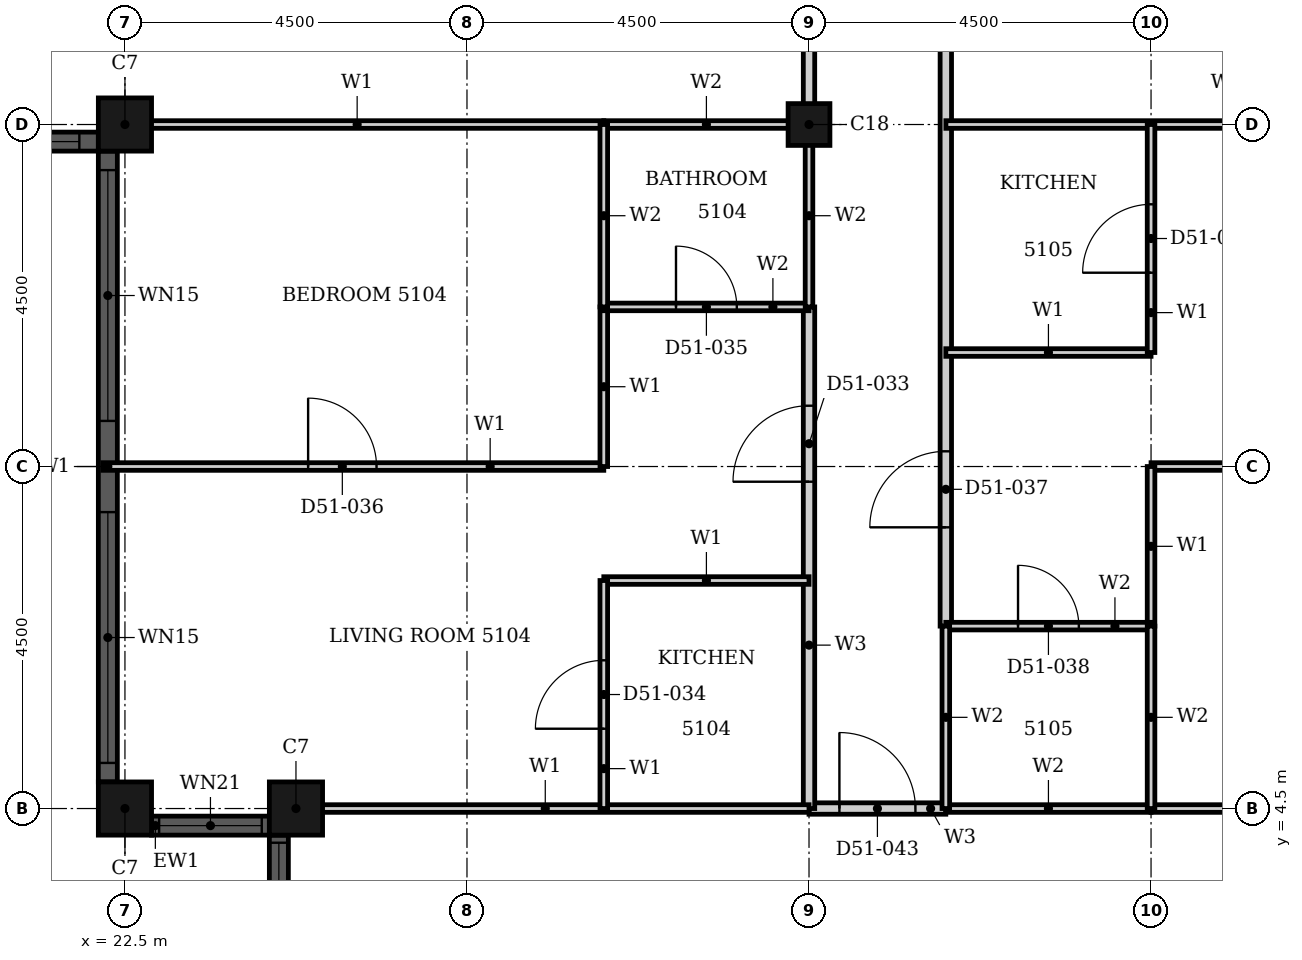
"""IFC4 building model, lengths in metres.
Left out: names, types, materials, properties, quantities, classifications, styles, units other than length and angle.
Written with IfcOpenShell. Run it as: python <this file> out.ifc"""

import sys

from ifc_helpers import new_model, si_unit, direction, frame, frame_2d, origin, origin_2d, place, context, subcontext, project, spatial, rectangle, hollow_rectangle, extrude, element, fill, save


model = new_model("IFC4")
c1 = context("Model", 3, precision=1e-05, world=origin(), true_north=direction((0.0, 1.0)))
c2 = subcontext(c1, "Body", "Model", "MODEL_VIEW")
j1 = project(units=[si_unit("LENGTHUNIT", "METRE"), si_unit("PLANEANGLEUNIT", "RADIAN")], contexts=[c1])
p1 = place(None, origin())
s1 = spatial("IfcSite", under=j1, at=p1, CompositionType="ELEMENT")
p2 = place(p1, origin())
s2 = spatial("IfcBuilding", under=s1, at=p2, CompositionType="ELEMENT")
p3 = place(p2, frame((0.0, 0.0, 203.5)))
s3 = spatial("IfcBuildingStorey", under=s2, at=p3, CompositionType="ELEMENT", Elevation=203.5)
for number, where, z_axis, x_axis in (
    (1, (22.5, 13.5, 0.0), (0.0, 0.0, 1.0), (1.0, 0.0, 0.0)),
    (2, (22.5, 4.5, 0.0), (0.0, 0.0, 1.0), (1.0, 0.0, 0.0)),
    (3, (24.75, 4.5, 0.0), (0.0, 0.0, 1.0), (1.0, 0.0, 0.0)),
):
    element("IfcColumn", number, at=place(p3, frame(where, z_axis=z_axis, x_axis=x_axis)), inside=s3, PredefinedType="COLUMN", context=c2, shape_type="SweptSolid", body=[
        extrude(hollow_rectangle(XDim=0.7, YDim=0.7, WallThickness=0.022, at=origin_2d()), origin(), (0.0, 0.0, 1.0), 3.7),
    ])
p4 = place(p3, frame((31.5, 13.5, 0.0), z_axis=(0.0, 0.0, 1.0), x_axis=(1.0, 0.0, 0.0)))
e4 = element("IfcColumn", 4, at=p4, inside=s3, PredefinedType="COLUMN", context=c2, shape_type="SweptSolid", body=[
    extrude(hollow_rectangle(XDim=0.55, YDim=0.55, WallThickness=0.018, at=origin_2d()), origin(), (0.0, 0.0, 1.0), 3.7),
])
p5 = place(p3, frame((18.35, 13.275, 0.0), z_axis=(0.0, 0.0, 1.0), x_axis=(1.0, 0.0, 0.0)))
e5 = element("IfcWall", 5, at=p5, inside=s3, PredefinedType="SOLIDWALL", context=c2, shape_type="SweptSolid", body=[
    extrude(rectangle(XDim=3.8, YDim=0.25, at=frame_2d((1.9, 0.0))), origin(), (0.0, 0.0, 1.0), 3.7),
])
p6 = place(p5, frame((0.25, 0.0, 0.45)))
e6 = element("IfcOpeningElement", 6, at=p6, cuts=e5, PredefinedType="OPENING", context=c2, shape_type="SweptSolid", body=[
    extrude(rectangle(XDim=3.3, YDim=2.3, at=frame_2d((1.65, 1.15))), frame((0.0, 0.135, 0.0), z_axis=(0.0, -1.0, 0.0), x_axis=(1.0, 0.0, 0.0)), (0.0, 0.0, 1.0), 0.27),
])
p7 = place(p3, frame((22.275, 13.15, 0.0), z_axis=(0.0, 0.0, 1.0), x_axis=(0.0, -1.0, 0.0)))
e7 = element("IfcWall", 7, at=p7, inside=s3, PredefinedType="SOLIDWALL", context=c2, shape_type="SweptSolid", body=[
    extrude(rectangle(XDim=8.3, YDim=0.25, at=frame_2d((4.15, 0.0))), origin(), (0.0, 0.0, 1.0), 3.7),
])
p8 = place(p7, frame((0.25, 0.0, 0.45)))
e8 = element("IfcOpeningElement", 8, at=p8, cuts=e7, PredefinedType="OPENING", context=c2, shape_type="SweptSolid", body=[
    extrude(rectangle(XDim=3.3, YDim=2.3, at=frame_2d((1.65, 1.15))), frame((0.0, 0.135, 0.0), z_axis=(0.0, -1.0, 0.0), x_axis=(1.0, 0.0, 0.0)), (0.0, 0.0, 1.0), 0.27),
])
p9 = place(p7, frame((4.75, 0.0, 0.45)))
e9 = element("IfcOpeningElement", 9, at=p9, cuts=e7, PredefinedType="OPENING", context=c2, shape_type="SweptSolid", body=[
    extrude(rectangle(XDim=3.3, YDim=2.3, at=frame_2d((1.65, 1.15))), frame((0.0, 0.135, 0.0), z_axis=(0.0, -1.0, 0.0), x_axis=(1.0, 0.0, 0.0)), (0.0, 0.0, 1.0), 0.27),
])
p10 = place(p3, frame((22.85, 4.275, 0.0), z_axis=(0.0, 0.0, 1.0), x_axis=(1.0, 0.0, 0.0)))
e10 = element("IfcWall", 10, at=p10, inside=s3, PredefinedType="SOLIDWALL", context=c2, shape_type="SweptSolid", body=[
    extrude(rectangle(XDim=1.55, YDim=0.25, at=frame_2d((0.775, 0.0))), origin(), (0.0, 0.0, 1.0), 3.7),
])
p11 = place(p10, frame((0.1, 0.0, 0.9)))
e11 = element("IfcOpeningElement", 11, at=p11, cuts=e10, PredefinedType="OPENING", context=c2, shape_type="SweptSolid", body=[
    extrude(rectangle(XDim=1.35, YDim=1.85, at=frame_2d((0.675, 0.925))), frame((0.0, 0.135, 0.0), z_axis=(0.0, -1.0, 0.0), x_axis=(1.0, 0.0, 0.0)), (0.0, 0.0, 1.0), 0.27),
])
p12 = place(p3, frame((24.525, 4.15, 0.0), z_axis=(0.0, 0.0, 1.0), x_axis=(0.0, -1.0, 0.0)))
e12 = element("IfcWall", 12, at=p12, inside=s3, PredefinedType="SOLIDWALL", context=c2, shape_type="SweptSolid", body=[
    extrude(rectangle(XDim=1.55, YDim=0.25, at=frame_2d((0.775, 0.0))), origin(), (0.0, 0.0, 1.0), 3.7),
])
p13 = place(p12, frame((0.1, 0.0, 0.9)))
e13 = element("IfcOpeningElement", 13, at=p13, cuts=e12, PredefinedType="OPENING", context=c2, shape_type="SweptSolid", body=[
    extrude(rectangle(XDim=1.35, YDim=1.85, at=frame_2d((0.675, 0.925))), frame((0.0, 0.135, 0.0), z_axis=(0.0, -1.0, 0.0), x_axis=(1.0, 0.0, 0.0)), (0.0, 0.0, 1.0), 0.27),
])
p14 = place(p3, frame((31.5, 4.5, 0.0), z_axis=(0.0, 0.0, 1.0), x_axis=(1.0, 0.0, 0.0)))
e14 = element("IfcWall", 14, at=p14, inside=s3, PredefinedType="PARTITIONING", context=c2, shape_type="SweptSolid", body=[
    extrude(rectangle(XDim=1.8, YDim=0.15, at=frame_2d((0.9, 0.0))), origin(), (0.0, 0.0, 1.0), 3.4),
])
p15 = place(p14, frame((0.4, 0.0, 0.0)))
e15 = element("IfcOpeningElement", 15, at=p15, cuts=e14, PredefinedType="OPENING", context=c2, shape_type="SweptSolid", body=[
    extrude(rectangle(XDim=1.0, YDim=2.1, at=frame_2d((0.5, 1.05))), frame((0.0, 0.085, 0.0), z_axis=(0.0, -1.0, 0.0), x_axis=(1.0, 0.0, 0.0)), (0.0, 0.0, 1.0), 0.17),
])
p16 = place(p3, frame((31.5, 4.5, 0.0), z_axis=(0.0, 0.0, 1.0), x_axis=(0.0, 1.0, 0.0)))
e16 = element("IfcWall", 16, at=p16, inside=s3, PredefinedType="PARTITIONING", context=c2, shape_type="SweptSolid", body=[
    extrude(rectangle(XDim=6.6, YDim=0.15, at=frame_2d((3.3, 0.0))), origin(), (0.0, 0.0, 1.0), 2.68),
])
p17 = place(p16, frame((4.3, 0.0, 0.0)))
e17 = element("IfcOpeningElement", 17, at=p17, cuts=e16, PredefinedType="OPENING", context=c2, shape_type="SweptSolid", body=[
    extrude(rectangle(XDim=1.0, YDim=2.2, at=frame_2d((0.5, 1.1))), frame((0.0, 0.085, 0.0), z_axis=(0.0, -1.0, 0.0), x_axis=(1.0, 0.0, 0.0)), (0.0, 0.0, 1.0), 0.17),
])
p18 = place(p3, frame((31.5, 13.5, 0.0), z_axis=(0.0, 0.0, 1.0), x_axis=(0.0, 1.0, 0.0)))
e18 = element("IfcWall", 18, at=p18, inside=s3, PredefinedType="PARTITIONING", context=c2, shape_type="SweptSolid", body=[
    extrude(rectangle(XDim=7.2, YDim=0.15, at=frame_2d((3.6, 0.0))), origin(), (0.0, 0.0, 1.0), 3.4),
])
p19 = place(p3, frame((33.3, 6.9, 0.0), z_axis=(0.0, 0.0, 1.0), x_axis=(0.0, 1.0, 0.0)))
e19 = element("IfcWall", 19, at=p19, inside=s3, PredefinedType="PARTITIONING", context=c2, shape_type="SweptSolid", body=[
    extrude(rectangle(XDim=13.799, YDim=0.15, at=frame_2d((6.899, 0.0))), origin(), (0.0, 0.0, 1.0), 3.4),
])
p20 = place(p19, frame((1.3, 0.0, 0.0)))
e20 = element("IfcOpeningElement", 20, at=p20, cuts=e19, PredefinedType="OPENING", context=c2, shape_type="SweptSolid", body=[
    extrude(rectangle(XDim=1.0, YDim=2.2, at=frame_2d((0.5, 1.1))), frame((0.0, 0.085, 0.0), z_axis=(0.0, -1.0, 0.0), x_axis=(1.0, 0.0, 0.0)), (0.0, 0.0, 1.0), 0.17),
])
p21 = place(p3, frame((33.3, 10.5, 0.0), z_axis=(0.0, 0.0, 1.0), x_axis=(1.0, 0.0, 0.0)))
e21 = element("IfcWall", 21, at=p21, inside=s3, PredefinedType="PARTITIONING", context=c2, shape_type="SweptSolid", body=[
    extrude(rectangle(XDim=2.7, YDim=0.1, at=frame_2d((1.35, 0.0))), origin(), (0.0, 0.0, 1.0), 3.4),
])
p22 = place(p3, frame((33.301, 13.5, 0.0), z_axis=(0.0, 0.0, 1.0), x_axis=(1.0, 0.0, 0.0)))
e22 = element("IfcWall", 22, at=p22, inside=s3, PredefinedType="PARTITIONING", context=c2, shape_type="SweptSolid", body=[
    extrude(rectangle(XDim=7.389, YDim=0.1, at=frame_2d((3.694, 0.0))), origin(), (0.0, 0.0, 1.0), 2.48),
])
p23 = place(p3, frame((22.31, 13.5, 0.0), z_axis=(0.0, 0.0, 1.0), x_axis=(1.0, 0.0, 0.0)))
e23 = element("IfcWall", 23, at=p23, inside=s3, PredefinedType="PARTITIONING", context=c2, shape_type="SweptSolid", body=[
    extrude(rectangle(XDim=6.49, YDim=0.1, at=frame_2d((3.245, 0.0))), origin(), (0.0, 0.0, 1.0), 2.48),
])
p24 = place(p3, frame((36.0, 4.5, 0.0), z_axis=(0.0, 0.0, 1.0), x_axis=(1.0, 0.0, 0.0)))
e24 = element("IfcWall", 24, at=p24, inside=s3, PredefinedType="PARTITIONING", context=c2, shape_type="SweptSolid", body=[
    extrude(rectangle(XDim=2.44, YDim=0.1, at=frame_2d((1.22, 0.0))), origin(), (0.0, 0.0, 1.0), 3.4),
])
p25 = place(p3, frame((24.56, 4.5, 0.0), z_axis=(0.0, 0.0, 1.0), x_axis=(1.0, 0.0, 0.0)))
e25 = element("IfcWall", 25, at=p25, inside=s3, PredefinedType="PARTITIONING", context=c2, shape_type="SweptSolid", body=[
    extrude(rectangle(XDim=6.94, YDim=0.1, at=frame_2d((3.47, 0.0))), origin(), (0.0, 0.0, 1.0), 3.4),
])
p26 = place(p3, frame((28.8, 7.5, 0.0), z_axis=(0.0, 0.0, 1.0), x_axis=(1.0, 0.0, 0.0)))
e26 = element("IfcWall", 26, at=p26, inside=s3, PredefinedType="PARTITIONING", context=c2, shape_type="SweptSolid", body=[
    extrude(rectangle(XDim=2.7, YDim=0.1, at=frame_2d((1.35, 0.0))), origin(), (0.0, 0.0, 1.0), 3.4),
])
p27 = place(p3, frame((36.0, 9.0, 0.0), z_axis=(0.0, 0.0, 1.0), x_axis=(1.0, 0.0, 0.0)))
e27 = element("IfcWall", 27, at=p27, inside=s3, PredefinedType="PARTITIONING", context=c2, shape_type="SweptSolid", body=[
    extrude(rectangle(XDim=4.79, YDim=0.1, at=frame_2d((2.395, 0.0))), origin(), (0.0, 0.0, 1.0), 3.4),
])
p28 = place(p27, frame((1.8, 0.0, 0.0)))
e28 = element("IfcOpeningElement", 28, at=p28, cuts=e27, PredefinedType="OPENING", context=c2, shape_type="SweptSolid", body=[
    extrude(rectangle(XDim=0.9, YDim=2.1, at=frame_2d((0.45, 1.05))), frame((0.0, 0.06, 0.0), z_axis=(0.0, -1.0, 0.0), x_axis=(1.0, 0.0, 0.0)), (0.0, 0.0, 1.0), 0.12),
])
p29 = place(p3, frame((22.21, 9.0, 0.0), z_axis=(0.0, 0.0, 1.0), x_axis=(1.0, 0.0, 0.0)))
e29 = element("IfcWall", 29, at=p29, inside=s3, PredefinedType="PARTITIONING", context=c2, shape_type="SweptSolid", body=[
    extrude(rectangle(XDim=6.59, YDim=0.1, at=frame_2d((3.295, 0.0))), origin(), (0.0, 0.0, 1.0), 3.4),
])
p30 = place(p29, frame((2.7, 0.0, 0.0)))
e30 = element("IfcOpeningElement", 30, at=p30, cuts=e29, PredefinedType="OPENING", context=c2, shape_type="SweptSolid", body=[
    extrude(rectangle(XDim=0.9, YDim=2.1, at=frame_2d((0.45, 1.05))), frame((0.0, 0.06, 0.0), z_axis=(0.0, -1.0, 0.0), x_axis=(1.0, 0.0, 0.0)), (0.0, 0.0, 1.0), 0.12),
])
p31 = place(p3, frame((28.8, 9.0, 0.0), z_axis=(0.0, 0.0, 1.0), x_axis=(0.0, 1.0, 0.0)))
e31 = element("IfcWall", 31, at=p31, inside=s3, PredefinedType="PARTITIONING", context=c2, shape_type="SweptSolid", body=[
    extrude(rectangle(XDim=2.1, YDim=0.1, at=frame_2d((1.05, 0.0))), origin(), (0.0, 0.0, 1.0), 3.4),
])
p32 = place(p3, frame((28.8, 4.5, 0.0), z_axis=(0.0, 0.0, 1.0), x_axis=(0.0, 1.0, 0.0)))
e32 = element("IfcWall", 32, at=p32, inside=s3, PredefinedType="PARTITIONING", context=c2, shape_type="SweptSolid", body=[
    extrude(rectangle(XDim=3.0, YDim=0.1, at=frame_2d((1.5, 0.0))), origin(), (0.0, 0.0, 1.0), 3.4),
])
p33 = place(p32, frame((1.05, 0.0, 0.0)))
e33 = element("IfcOpeningElement", 33, at=p33, cuts=e32, PredefinedType="OPENING", context=c2, shape_type="SweptSolid", body=[
    extrude(rectangle(XDim=0.9, YDim=2.1, at=frame_2d((0.45, 1.05))), frame((0.0, 0.06, 0.0), z_axis=(0.0, -1.0, 0.0), x_axis=(1.0, 0.0, 0.0)), (0.0, 0.0, 1.0), 0.12),
])
p34 = place(p3, frame((36.0, 6.9, 0.0), z_axis=(0.0, 0.0, 1.0), x_axis=(0.0, 1.0, 0.0)))
e34 = element("IfcWall", 34, at=p34, inside=s3, PredefinedType="PARTITIONING", context=c2, shape_type="SweptSolid", body=[
    extrude(rectangle(XDim=2.1, YDim=0.1, at=frame_2d((1.05, 0.0))), origin(), (0.0, 0.0, 1.0), 2.68),
])
p35 = place(p3, frame((36.0, 10.5, 0.0), z_axis=(0.0, 0.0, 1.0), x_axis=(0.0, 1.0, 0.0)))
e35 = element("IfcWall", 35, at=p35, inside=s3, PredefinedType="PARTITIONING", context=c2, shape_type="SweptSolid", body=[
    extrude(rectangle(XDim=3.0, YDim=0.1, at=frame_2d((1.5, 0.0))), origin(), (0.0, 0.0, 1.0), 2.68),
])
p36 = place(p35, frame((1.05, 0.0, 0.0)))
e36 = element("IfcOpeningElement", 36, at=p36, cuts=e35, PredefinedType="OPENING", context=c2, shape_type="SweptSolid", body=[
    extrude(rectangle(XDim=0.9, YDim=2.1, at=frame_2d((0.45, 1.05))), frame((0.0, 0.06, 0.0), z_axis=(0.0, -1.0, 0.0), x_axis=(1.0, 0.0, 0.0)), (0.0, 0.0, 1.0), 0.12),
])
p37 = place(p3, frame((28.8, 11.1, 0.0), z_axis=(0.0, 0.0, 1.0), x_axis=(1.0, 0.0, 0.0)))
e37 = element("IfcWall", 37, at=p37, inside=s3, PredefinedType="PARTITIONING", context=c2, shape_type="SweptSolid", body=[
    extrude(rectangle(XDim=2.7, YDim=0.1, at=frame_2d((1.35, 0.0))), origin(), (0.0, 0.0, 1.0), 3.4),
])
p38 = place(p37, frame((0.95, 0.0, 0.0)))
e38 = element("IfcOpeningElement", 38, at=p38, cuts=e37, PredefinedType="OPENING", context=c2, shape_type="SweptSolid", body=[
    extrude(rectangle(XDim=0.8, YDim=2.1, at=frame_2d((0.4, 1.05))), frame((0.0, 0.06, 0.0), z_axis=(0.0, -1.0, 0.0), x_axis=(1.0, 0.0, 0.0)), (0.0, 0.0, 1.0), 0.12),
])
p39 = place(p3, frame((28.8, 13.5, 0.0), z_axis=(0.0, 0.0, 1.0), x_axis=(1.0, 0.0, 0.0)))
e39 = element("IfcWall", 39, at=p39, inside=s3, PredefinedType="PARTITIONING", context=c2, shape_type="SweptSolid", body=[
    extrude(rectangle(XDim=2.7, YDim=0.1, at=frame_2d((1.35, 0.0))), origin(), (0.0, 0.0, 1.0), 2.48),
])
p40 = place(p3, frame((33.3, 4.5, 0.0), z_axis=(0.0, 0.0, 1.0), x_axis=(1.0, 0.0, 0.0)))
e40 = element("IfcWall", 40, at=p40, inside=s3, PredefinedType="PARTITIONING", context=c2, shape_type="SweptSolid", body=[
    extrude(rectangle(XDim=2.7, YDim=0.1, at=frame_2d((1.35, 0.0))), origin(), (0.0, 0.0, 1.0), 3.4),
])
p41 = place(p3, frame((33.3, 6.9, 0.0), z_axis=(0.0, 0.0, 1.0), x_axis=(1.0, 0.0, 0.0)))
e41 = element("IfcWall", 41, at=p41, inside=s3, PredefinedType="PARTITIONING", context=c2, shape_type="SweptSolid", body=[
    extrude(rectangle(XDim=2.7, YDim=0.1, at=frame_2d((1.35, 0.0))), origin(), (0.0, 0.0, 1.0), 3.4),
])
p42 = place(p41, frame((0.95, 0.0, 0.0)))
e42 = element("IfcOpeningElement", 42, at=p42, cuts=e41, PredefinedType="OPENING", context=c2, shape_type="SweptSolid", body=[
    extrude(rectangle(XDim=0.8, YDim=2.1, at=frame_2d((0.4, 1.05))), frame((0.0, 0.06, 0.0), z_axis=(0.0, -1.0, 0.0), x_axis=(1.0, 0.0, 0.0)), (0.0, 0.0, 1.0), 0.12),
])
p43 = place(p3, frame((28.8, 11.1, 0.0), z_axis=(0.0, 0.0, 1.0), x_axis=(0.0, 1.0, 0.0)))
e43 = element("IfcWall", 43, at=p43, inside=s3, PredefinedType="PARTITIONING", context=c2, shape_type="SweptSolid", body=[
    extrude(rectangle(XDim=2.4, YDim=0.1, at=frame_2d((1.2, 0.0))), origin(), (0.0, 0.0, 1.0), 3.4),
])
p44 = place(p3, frame((31.5, 11.1, 0.0), z_axis=(0.0, 0.0, 1.0), x_axis=(0.0, 1.0, 0.0)))
e44 = element("IfcWall", 44, at=p44, inside=s3, PredefinedType="PARTITIONING", context=c2, shape_type="SweptSolid", body=[
    extrude(rectangle(XDim=2.4, YDim=0.1, at=frame_2d((1.2, 0.0))), origin(), (0.0, 0.0, 1.0), 2.68),
])
p45 = place(p3, frame((33.3, 4.5, 0.0), z_axis=(0.0, 0.0, 1.0), x_axis=(0.0, 1.0, 0.0)))
e45 = element("IfcWall", 45, at=p45, inside=s3, PredefinedType="PARTITIONING", context=c2, shape_type="SweptSolid", body=[
    extrude(rectangle(XDim=2.4, YDim=0.1, at=frame_2d((1.2, 0.0))), origin(), (0.0, 0.0, 1.0), 3.4),
])
p46 = place(p3, frame((36.0, 4.5, 0.0), z_axis=(0.0, 0.0, 1.0), x_axis=(0.0, 1.0, 0.0)))
e46 = element("IfcWall", 46, at=p46, inside=s3, PredefinedType="PARTITIONING", context=c2, shape_type="SweptSolid", body=[
    extrude(rectangle(XDim=2.4, YDim=0.1, at=frame_2d((1.2, 0.0))), origin(), (0.0, 0.0, 1.0), 2.68),
])
p47 = place(p6, origin())
e47 = element("IfcWindow", 47, at=p47, inside=s3, PartitioningType="SINGLE_PANEL", PredefinedType="WINDOW", context=c2, shape_type="SweptSolid", body=[
    extrude(rectangle(XDim=3.3, YDim=2.3, at=frame_2d((1.65, 1.15))), frame((0.0, 0.03, 0.0), z_axis=(0.0, -1.0, 0.0), x_axis=(1.0, 0.0, 0.0)), (0.0, 0.0, 1.0), 0.06),
])
fill(e6, e47)
p48 = place(p8, origin())
e48 = element("IfcWindow", 48, at=p48, inside=s3, PartitioningType="SINGLE_PANEL", PredefinedType="WINDOW", context=c2, shape_type="SweptSolid", body=[
    extrude(rectangle(XDim=3.3, YDim=2.3, at=frame_2d((1.65, 1.15))), frame((0.0, 0.03, 0.0), z_axis=(0.0, -1.0, 0.0), x_axis=(1.0, 0.0, 0.0)), (0.0, 0.0, 1.0), 0.06),
])
fill(e8, e48)
p49 = place(p9, origin())
e49 = element("IfcWindow", 49, at=p49, inside=s3, PartitioningType="SINGLE_PANEL", PredefinedType="WINDOW", context=c2, shape_type="SweptSolid", body=[
    extrude(rectangle(XDim=3.3, YDim=2.3, at=frame_2d((1.65, 1.15))), frame((0.0, 0.03, 0.0), z_axis=(0.0, -1.0, 0.0), x_axis=(1.0, 0.0, 0.0)), (0.0, 0.0, 1.0), 0.06),
])
fill(e9, e49)
p50 = place(p11, origin())
e50 = element("IfcWindow", 50, at=p50, inside=s3, PartitioningType="SINGLE_PANEL", PredefinedType="WINDOW", context=c2, shape_type="SweptSolid", body=[
    extrude(rectangle(XDim=1.35, YDim=1.85, at=frame_2d((0.675, 0.925))), frame((0.0, 0.03, 0.0), z_axis=(0.0, -1.0, 0.0), x_axis=(1.0, 0.0, 0.0)), (0.0, 0.0, 1.0), 0.06),
])
fill(e11, e50)
p51 = place(p13, origin())
e51 = element("IfcWindow", 51, at=p51, inside=s3, PartitioningType="SINGLE_PANEL", PredefinedType="WINDOW", context=c2, shape_type="SweptSolid", body=[
    extrude(rectangle(XDim=1.35, YDim=1.85, at=frame_2d((0.675, 0.925))), frame((0.0, 0.03, 0.0), z_axis=(0.0, -1.0, 0.0), x_axis=(1.0, 0.0, 0.0)), (0.0, 0.0, 1.0), 0.06),
])
fill(e13, e51)
p52 = place(p17, origin())
e52 = element("IfcDoor", 52, at=p52, inside=s3, OperationType="SINGLE_SWING_LEFT", PredefinedType="DOOR", context=c2, shape_type="SweptSolid", body=[
    extrude(rectangle(XDim=1.0, YDim=2.2, at=frame_2d((0.5, 1.1))), frame((0.0, 0.025, 0.0), z_axis=(0.0, -1.0, 0.0), x_axis=(1.0, 0.0, 0.0)), (0.0, 0.0, 1.0), 0.05),
])
fill(e17, e52)
p53 = place(p33, origin())
e53 = element("IfcDoor", 53, at=p53, inside=s3, OperationType="SINGLE_SWING_RIGHT", PredefinedType="DOOR", context=c2, shape_type="SweptSolid", body=[
    extrude(rectangle(XDim=0.9, YDim=2.1, at=frame_2d((0.45, 1.05))), frame((0.0, 0.025, 0.0), z_axis=(0.0, -1.0, 0.0), x_axis=(1.0, 0.0, 0.0)), (0.0, 0.0, 1.0), 0.05),
])
fill(e33, e53)
p54 = place(p38, origin())
e54 = element("IfcDoor", 54, at=p54, inside=s3, OperationType="SINGLE_SWING_LEFT", PredefinedType="DOOR", context=c2, shape_type="SweptSolid", body=[
    extrude(rectangle(XDim=0.8, YDim=2.1, at=frame_2d((0.4, 1.05))), frame((0.0, 0.025, 0.0), z_axis=(0.0, -1.0, 0.0), x_axis=(1.0, 0.0, 0.0)), (0.0, 0.0, 1.0), 0.05),
])
fill(e38, e54)
p55 = place(p30, origin())
e55 = element("IfcDoor", 55, at=p55, inside=s3, OperationType="SINGLE_SWING_LEFT", PredefinedType="DOOR", context=c2, shape_type="SweptSolid", body=[
    extrude(rectangle(XDim=0.9, YDim=2.1, at=frame_2d((0.45, 1.05))), frame((0.0, 0.025, 0.0), z_axis=(0.0, -1.0, 0.0), x_axis=(1.0, 0.0, 0.0)), (0.0, 0.0, 1.0), 0.05),
])
fill(e30, e55)
p56 = place(p20, origin())
e56 = element("IfcDoor", 56, at=p56, inside=s3, OperationType="SINGLE_SWING_RIGHT", PredefinedType="DOOR", context=c2, shape_type="SweptSolid", body=[
    extrude(rectangle(XDim=1.0, YDim=2.2, at=frame_2d((0.5, 1.1))), frame((0.0, 0.025, 0.0), z_axis=(0.0, -1.0, 0.0), x_axis=(1.0, 0.0, 0.0)), (0.0, 0.0, 1.0), 0.05),
])
fill(e20, e56)
p57 = place(p42, origin())
e57 = element("IfcDoor", 57, at=p57, inside=s3, OperationType="SINGLE_SWING_RIGHT", PredefinedType="DOOR", context=c2, shape_type="SweptSolid", body=[
    extrude(rectangle(XDim=0.8, YDim=2.1, at=frame_2d((0.4, 1.05))), frame((0.0, 0.025, 0.0), z_axis=(0.0, -1.0, 0.0), x_axis=(1.0, 0.0, 0.0)), (0.0, 0.0, 1.0), 0.05),
])
fill(e42, e57)
p58 = place(p36, origin())
e58 = element("IfcDoor", 58, at=p58, inside=s3, OperationType="SINGLE_SWING_LEFT", PredefinedType="DOOR", context=c2, shape_type="SweptSolid", body=[
    extrude(rectangle(XDim=0.9, YDim=2.1, at=frame_2d((0.45, 1.05))), frame((0.0, 0.025, 0.0), z_axis=(0.0, -1.0, 0.0), x_axis=(1.0, 0.0, 0.0)), (0.0, 0.0, 1.0), 0.05),
])
fill(e36, e58)
p59 = place(p15, origin())
e59 = element("IfcDoor", 59, at=p59, inside=s3, OperationType="SINGLE_SWING_LEFT", PredefinedType="DOOR", context=c2, shape_type="SweptSolid", body=[
    extrude(rectangle(XDim=1.0, YDim=2.1, at=frame_2d((0.5, 1.05))), frame((0.0, 0.025, 0.0), z_axis=(0.0, -1.0, 0.0), x_axis=(1.0, 0.0, 0.0)), (0.0, 0.0, 1.0), 0.05),
])
fill(e15, e59)
save(model, sys.argv[1])
